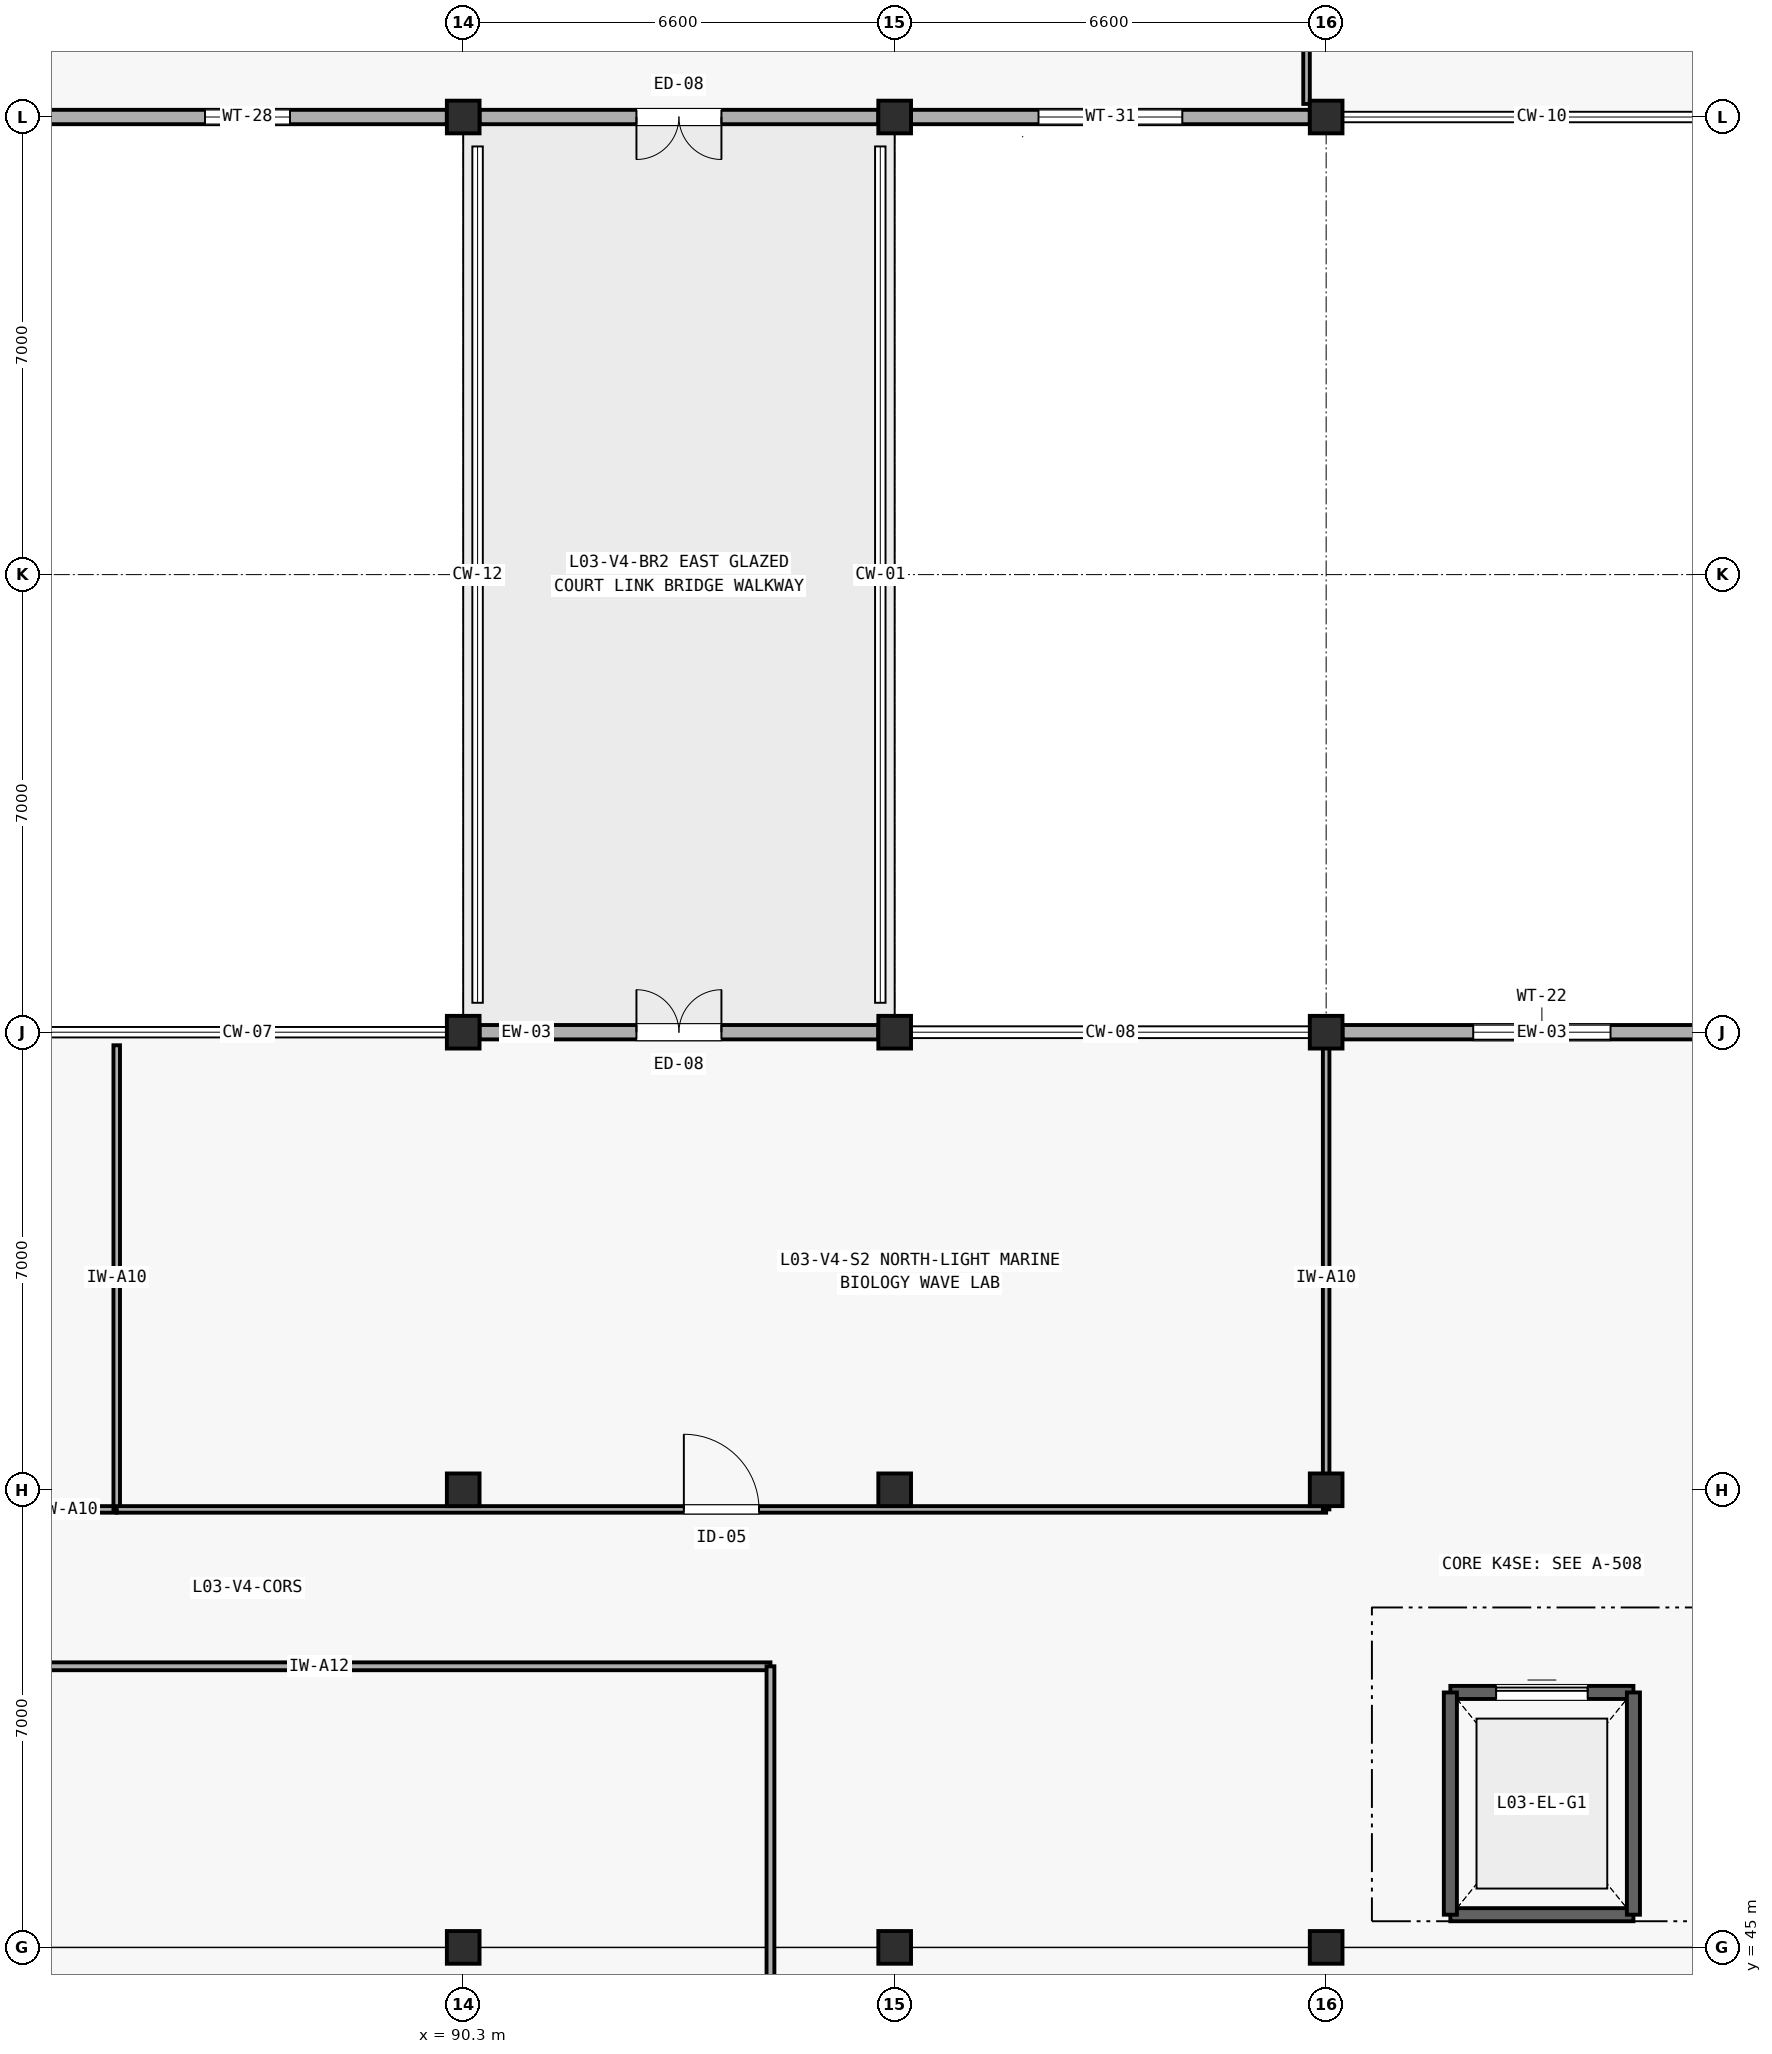
"""IFC4 building model, lengths in metres.
Left out: names, types, materials, properties, quantities, classifications, styles, units other than length and angle.
Written with IfcOpenShell. Run it as: python <this file> out.ifc"""

import sys

from ifc_helpers import new_model, si_unit, direction, frame, frame_2d, origin, origin_2d, place, context, subcontext, project, spatial, rectangle, extrude, element, fill, save


model = new_model("IFC4")
c1 = context("Model", 3, precision=1e-05, world=origin(), true_north=direction((0.0, 1.0)))
c2 = subcontext(c1, "Body", "Model", "MODEL_VIEW")
j1 = project(units=[si_unit("LENGTHUNIT", "METRE"), si_unit("PLANEANGLEUNIT", "RADIAN")], contexts=[c1])
p1 = place(None, origin())
s1 = spatial("IfcSite", under=j1, at=p1, CompositionType="ELEMENT")
p2 = place(p1, origin())
s2 = spatial("IfcBuilding", under=s1, at=p2, CompositionType="ELEMENT")
p3 = place(p2, frame((0.0, 0.0, 12.6)))
s3 = spatial("IfcBuildingStorey", under=s2, at=p3, CompositionType="ELEMENT", Elevation=12.6)
for number, where, z_axis, x_axis in (
    (1, (90.3, 45.0, 0.0), (0.0, 0.0, 1.0), (1.0, 0.0, 0.0)),
    (2, (90.3, 52.0, 0.0), (0.0, 0.0, 1.0), (1.0, 0.0, 0.0)),
    (3, (90.3, 59.0, 0.0), (0.0, 0.0, 1.0), (1.0, 0.0, 0.0)),
    (4, (90.3, 73.0, 0.0), (0.0, 0.0, 1.0), (1.0, 0.0, 0.0)),
    (5, (96.9, 45.0, 0.0), (0.0, 0.0, 1.0), (1.0, 0.0, 0.0)),
    (6, (96.9, 52.0, 0.0), (0.0, 0.0, 1.0), (1.0, 0.0, 0.0)),
    (7, (96.9, 59.0, 0.0), (0.0, 0.0, 1.0), (1.0, 0.0, 0.0)),
    (8, (96.9, 73.0, 0.0), (0.0, 0.0, 1.0), (1.0, 0.0, 0.0)),
    (9, (103.5, 45.0, 0.0), (0.0, 0.0, 1.0), (1.0, 0.0, 0.0)),
    (10, (103.5, 52.0, 0.0), (0.0, 0.0, 1.0), (1.0, 0.0, 0.0)),
    (11, (103.5, 59.0, 0.0), (0.0, 0.0, 1.0), (1.0, 0.0, 0.0)),
    (12, (103.5, 73.0, 0.0), (0.0, 0.0, 1.0), (1.0, 0.0, 0.0)),
):
    element("IfcColumn", number, at=place(p3, frame(where, z_axis=z_axis, x_axis=x_axis)), inside=s3, PredefinedType="COLUMN", context=c2, shape_type="SweptSolid", body=[
        extrude(rectangle(XDim=0.5, YDim=0.5, at=origin_2d()), origin(), (0.0, 0.0, 1.0), 4.2),
    ])
p4 = place(p3, frame((90.55, 59.0, 0.0), z_axis=(0.0, 0.0, 1.0), x_axis=(1.0, 0.0, 0.0)))
e13 = element("IfcWall", 13, at=p4, inside=s3, PredefinedType="SOLIDWALL", context=c2, shape_type="SweptSolid", body=[
    extrude(rectangle(XDim=6.1, YDim=0.22, at=frame_2d((3.05, 0.0))), origin(), (0.0, 0.0, 1.0), 3.405),
])
p5 = place(p4, frame((2.4, 0.0, 0.0)))
e14 = element("IfcOpeningElement", 14, at=p5, cuts=e13, PredefinedType="OPENING", context=c2, shape_type="SweptSolid", body=[
    extrude(rectangle(XDim=1.3, YDim=2.15, at=frame_2d((0.65, 1.075))), frame((0.0, 0.12, 0.0), z_axis=(0.0, -1.0, 0.0), x_axis=(1.0, 0.0, 0.0)), (0.0, 0.0, 1.0), 0.24),
])
p6 = place(p3, frame((103.75, 59.0, 0.0), z_axis=(0.0, 0.0, 1.0), x_axis=(1.0, 0.0, 0.0)))
e15 = element("IfcWall", 15, at=p6, inside=s3, PredefinedType="SOLIDWALL", context=c2, shape_type="SweptSolid", body=[
    extrude(rectangle(XDim=6.1, YDim=0.22, at=frame_2d((3.05, 0.0))), origin(), (0.0, 0.0, 1.0), 3.405),
])
p7 = place(p6, frame((2.0, 0.0, 0.85)))
e16 = element("IfcOpeningElement", 16, at=p7, cuts=e15, PredefinedType="OPENING", context=c2, shape_type="SweptSolid", body=[
    extrude(rectangle(XDim=2.1, YDim=1.6, at=frame_2d((1.05, 0.8))), frame((0.0, 0.12, 0.0), z_axis=(0.0, -1.0, 0.0), x_axis=(1.0, 0.0, 0.0)), (0.0, 0.0, 1.0), 0.24),
])
p8 = place(p3, frame((83.95, 73.0, 0.0), z_axis=(0.0, 0.0, 1.0), x_axis=(1.0, 0.0, 0.0)))
e17 = element("IfcWall", 17, at=p8, inside=s3, PredefinedType="SOLIDWALL", context=c2, shape_type="SweptSolid", body=[
    extrude(rectangle(XDim=6.1, YDim=0.22, at=frame_2d((3.05, 0.0))), origin(), (0.0, 0.0, 1.0), 3.405),
])
p9 = place(p8, frame((2.4, 0.0, 0.85)))
e18 = element("IfcOpeningElement", 18, at=p9, cuts=e17, PredefinedType="OPENING", context=c2, shape_type="SweptSolid", body=[
    extrude(rectangle(XDim=1.3, YDim=1.45, at=frame_2d((0.65, 0.725))), frame((0.0, 0.12, 0.0), z_axis=(0.0, -1.0, 0.0), x_axis=(1.0, 0.0, 0.0)), (0.0, 0.0, 1.0), 0.24),
])
p10 = place(p3, frame((90.55, 73.0, 0.0), z_axis=(0.0, 0.0, 1.0), x_axis=(1.0, 0.0, 0.0)))
e19 = element("IfcWall", 19, at=p10, inside=s3, PredefinedType="SOLIDWALL", context=c2, shape_type="SweptSolid", body=[
    extrude(rectangle(XDim=6.1, YDim=0.22, at=frame_2d((3.05, 0.0))), origin(), (0.0, 0.0, 1.0), 3.405),
])
p11 = place(p10, frame((2.4, 0.0, 0.0)))
e20 = element("IfcOpeningElement", 20, at=p11, cuts=e19, PredefinedType="OPENING", context=c2, shape_type="SweptSolid", body=[
    extrude(rectangle(XDim=1.3, YDim=2.15, at=frame_2d((0.65, 1.075))), frame((0.0, 0.12, 0.0), z_axis=(0.0, -1.0, 0.0), x_axis=(1.0, 0.0, 0.0)), (0.0, 0.0, 1.0), 0.24),
])
p12 = place(p3, frame((97.15, 73.0, 0.0), z_axis=(0.0, 0.0, 1.0), x_axis=(1.0, 0.0, 0.0)))
e21 = element("IfcWall", 21, at=p12, inside=s3, PredefinedType="SOLIDWALL", context=c2, shape_type="SweptSolid", body=[
    extrude(rectangle(XDim=6.1, YDim=0.22, at=frame_2d((3.05, 0.0))), origin(), (0.0, 0.0, 1.0), 3.405),
])
p13 = place(p12, frame((1.95, 0.0, 0.85)))
e22 = element("IfcOpeningElement", 22, at=p13, cuts=e21, PredefinedType="OPENING", context=c2, shape_type="SweptSolid", body=[
    extrude(rectangle(XDim=2.2, YDim=1.2, at=frame_2d((1.1, 0.6))), frame((0.0, 0.12, 0.0), z_axis=(0.0, -1.0, 0.0), x_axis=(1.0, 0.0, 0.0)), (0.0, 0.0, 1.0), 0.24),
])
p14 = place(p3, frame((105.4, 45.5, 0.0), z_axis=(0.0, 0.0, 1.0), x_axis=(1.0, 0.0, 0.0)))
e23 = element("IfcWall", 23, at=p14, inside=s3, PredefinedType="SHEAR", context=c2, shape_type="SweptSolid", body=[
    extrude(rectangle(XDim=2.8, YDim=0.2, at=frame_2d((1.4, 0.0))), origin(), (0.0, 0.0, 1.0), 4.2),
])
p15 = place(p3, frame((105.4, 48.9, 0.0), z_axis=(0.0, 0.0, 1.0), x_axis=(1.0, 0.0, 0.0)))
e24 = element("IfcWall", 24, at=p15, inside=s3, PredefinedType="SHEAR", context=c2, shape_type="SweptSolid", body=[
    extrude(rectangle(XDim=2.8, YDim=0.2, at=frame_2d((1.4, 0.0))), origin(), (0.0, 0.0, 1.0), 4.2),
])
p16 = place(p15, frame((0.7, 0.0, 0.0)))
e25 = element("IfcOpeningElement", 25, at=p16, cuts=e24, PredefinedType="OPENING", context=c2, shape_type="SweptSolid", body=[
    extrude(rectangle(XDim=1.4, YDim=2.3, at=frame_2d((0.7, 1.15))), frame((0.0, 0.11, 0.0), z_axis=(0.0, -1.0, 0.0), x_axis=(1.0, 0.0, 0.0)), (0.0, 0.0, 1.0), 0.22),
])
for number, where, z_axis, x_axis in (
    (26, (105.4, 45.5, 0.0), (0.0, 0.0, 1.0), (0.0, 1.0, 0.0)),
    (27, (108.2, 45.5, 0.0), (0.0, 0.0, 1.0), (0.0, 1.0, 0.0)),
):
    element("IfcWall", number, at=place(p3, frame(where, z_axis=z_axis, x_axis=x_axis)), inside=s3, PredefinedType="SHEAR", context=c2, shape_type="SweptSolid", body=[
        extrude(rectangle(XDim=3.4, YDim=0.2, at=frame_2d((1.7, 0.0))), origin(), (0.0, 0.0, 1.0), 4.2),
    ])
p17 = place(p3, frame((63.6, 51.7, 0.0), z_axis=(0.0, 0.0, 1.0), x_axis=(1.0, 0.0, 0.0)))
e28 = element("IfcWall", 28, at=p17, inside=s3, PredefinedType="PARTITIONING", context=c2, shape_type="SweptSolid", body=[
    extrude(rectangle(XDim=21.4, YDim=0.1, at=frame_2d((10.7, 0.0))), origin(), (0.0, 0.0, 1.0), 3.405),
])
p18 = place(p17, frame((10.175, 0.0, 0.0)))
e29 = element("IfcOpeningElement", 29, at=p18, cuts=e28, PredefinedType="OPENING", context=c2, shape_type="SweptSolid", body=[
    extrude(rectangle(XDim=1.05, YDim=2.15, at=frame_2d((0.525, 1.075))), frame((0.0, 0.06, 0.0), z_axis=(0.0, -1.0, 0.0), x_axis=(1.0, 0.0, 0.0)), (0.0, 0.0, 1.0), 0.12),
])
p19 = place(p3, frame((85.0, 51.7, 0.0), z_axis=(0.0, 0.0, 1.0), x_axis=(0.0, 1.0, 0.0)))
e30 = element("IfcWall", 30, at=p19, inside=s3, PredefinedType="PARTITIONING", context=c2, shape_type="SweptSolid", body=[
    extrude(rectangle(XDim=7.1, YDim=0.1, at=frame_2d((3.55, 0.0))), origin(), (0.0, 0.0, 1.0), 3.9),
])
p20 = place(p3, frame((85.0, 51.7, 0.0), z_axis=(0.0, 0.0, 1.0), x_axis=(1.0, 0.0, 0.0)))
e31 = element("IfcWall", 31, at=p20, inside=s3, PredefinedType="PARTITIONING", context=c2, shape_type="SweptSolid", body=[
    extrude(rectangle(XDim=18.5, YDim=0.1, at=frame_2d((9.25, 0.0))), origin(), (0.0, 0.0, 1.0), 3.405),
])
p21 = place(p20, frame((8.675, 0.0, 0.0)))
e32 = element("IfcOpeningElement", 32, at=p21, cuts=e31, PredefinedType="OPENING", context=c2, shape_type="SweptSolid", body=[
    extrude(rectangle(XDim=1.15, YDim=2.15, at=frame_2d((0.575, 1.075))), frame((0.0, 0.06, 0.0), z_axis=(0.0, -1.0, 0.0), x_axis=(1.0, 0.0, 0.0)), (0.0, 0.0, 1.0), 0.12),
])
p22 = place(p3, frame((103.5, 51.7, 0.0), z_axis=(0.0, 0.0, 1.0), x_axis=(0.0, 1.0, 0.0)))
e33 = element("IfcWall", 33, at=p22, inside=s3, PredefinedType="PARTITIONING", context=c2, shape_type="SweptSolid", body=[
    extrude(rectangle(XDim=7.1, YDim=0.1, at=frame_2d((3.55, 0.0))), origin(), (0.0, 0.0, 1.0), 3.9),
])
p23 = place(p3, frame((64.2, 49.3, 0.0), z_axis=(0.0, 0.0, 1.0), x_axis=(1.0, 0.0, 0.0)))
e34 = element("IfcWall", 34, at=p23, inside=s3, PredefinedType="PARTITIONING", context=c2, shape_type="SweptSolid", body=[
    extrude(rectangle(XDim=30.8, YDim=0.12, at=frame_2d((15.4, 0.0))), origin(), (0.0, 0.0, 1.0), 3.9),
])
p24 = place(p23, frame((14.775, 0.0, 0.0)))
e35 = element("IfcOpeningElement", 35, at=p24, cuts=e34, PredefinedType="OPENING", context=c2, shape_type="SweptSolid", body=[
    extrude(rectangle(XDim=1.25, YDim=2.15, at=frame_2d((0.625, 1.075))), frame((0.0, 0.07, 0.0), z_axis=(0.0, -1.0, 0.0), x_axis=(1.0, 0.0, 0.0)), (0.0, 0.0, 1.0), 0.14),
])
p25 = place(p3, frame((95.0, 38.2, 0.0), z_axis=(0.0, 0.0, 1.0), x_axis=(0.0, 1.0, 0.0)))
e36 = element("IfcWall", 36, at=p25, inside=s3, PredefinedType="PARTITIONING", context=c2, shape_type="SweptSolid", body=[
    extrude(rectangle(XDim=11.1, YDim=0.12, at=frame_2d((5.55, 0.0))), origin(), (0.0, 0.0, 1.0), 3.9),
])
p26 = place(p3, frame((103.2, 73.2, 0.0), z_axis=(0.0, 0.0, 1.0), x_axis=(0.0, 1.0, 0.0)))
e37 = element("IfcWall", 37, at=p26, inside=s3, PredefinedType="PARTITIONING", context=c2, shape_type="SweptSolid", body=[
    extrude(rectangle(XDim=4.1, YDim=0.1, at=frame_2d((2.05, 0.0))), origin(), (0.0, 0.0, 1.0), 3.9),
])
p27 = place(p5, origin())
e38 = element("IfcDoor", 38, at=p27, inside=s3, OperationType="DOUBLE_DOOR_SINGLE_SWING", PredefinedType="DOOR", context=c2, shape_type="SweptSolid", body=[
    extrude(rectangle(XDim=1.3, YDim=2.15, at=frame_2d((0.65, 1.075))), frame((0.0, 0.025, 0.0), z_axis=(0.0, -1.0, 0.0), x_axis=(1.0, 0.0, 0.0)), (0.0, 0.0, 1.0), 0.05),
])
fill(e14, e38)
p28 = place(p7, origin())
e39 = element("IfcWindow", 39, at=p28, inside=s3, PartitioningType="SINGLE_PANEL", PredefinedType="WINDOW", context=c2, shape_type="SweptSolid", body=[
    extrude(rectangle(XDim=2.1, YDim=1.6, at=frame_2d((1.05, 0.8))), frame((0.0, 0.03, 0.0), z_axis=(0.0, -1.0, 0.0), x_axis=(1.0, 0.0, 0.0)), (0.0, 0.0, 1.0), 0.06),
])
fill(e16, e39)
p29 = place(p9, origin())
e40 = element("IfcWindow", 40, at=p29, inside=s3, PartitioningType="SINGLE_PANEL", PredefinedType="WINDOW", context=c2, shape_type="SweptSolid", body=[
    extrude(rectangle(XDim=1.3, YDim=1.45, at=frame_2d((0.65, 0.725))), frame((0.0, 0.03, 0.0), z_axis=(0.0, -1.0, 0.0), x_axis=(1.0, 0.0, 0.0)), (0.0, 0.0, 1.0), 0.06),
])
fill(e18, e40)
p30 = place(p11, frame((1.3, 0.0, 0.0), z_axis=(0.0, 0.0, 1.0), x_axis=(-1.0, 0.0, 0.0)))
e41 = element("IfcDoor", 41, at=p30, inside=s3, OperationType="DOUBLE_DOOR_SINGLE_SWING", PredefinedType="DOOR", context=c2, shape_type="SweptSolid", body=[
    extrude(rectangle(XDim=1.3, YDim=2.15, at=frame_2d((0.65, 1.075))), frame((0.0, 0.025, 0.0), z_axis=(0.0, -1.0, 0.0), x_axis=(1.0, 0.0, 0.0)), (0.0, 0.0, 1.0), 0.05),
])
fill(e20, e41)
p31 = place(p13, origin())
e42 = element("IfcWindow", 42, at=p31, inside=s3, PartitioningType="SINGLE_PANEL", PredefinedType="WINDOW", context=c2, shape_type="SweptSolid", body=[
    extrude(rectangle(XDim=2.2, YDim=1.2, at=frame_2d((1.1, 0.6))), frame((0.0, 0.03, 0.0), z_axis=(0.0, -1.0, 0.0), x_axis=(1.0, 0.0, 0.0)), (0.0, 0.0, 1.0), 0.06),
])
fill(e22, e42)
p32 = place(p16, origin())
e43 = element("IfcDoor", 43, at=p32, inside=s3, OperationType="SLIDING_TO_LEFT", PredefinedType="DOOR", context=c2, shape_type="SweptSolid", body=[
    extrude(rectangle(XDim=1.4, YDim=2.3, at=frame_2d((0.7, 1.15))), frame((0.0, 0.025, 0.0), z_axis=(0.0, -1.0, 0.0), x_axis=(1.0, 0.0, 0.0)), (0.0, 0.0, 1.0), 0.05),
])
fill(e25, e43)
p33 = place(p21, origin())
e44 = element("IfcDoor", 44, at=p33, inside=s3, OperationType="SINGLE_SWING_LEFT", PredefinedType="DOOR", context=c2, shape_type="SweptSolid", body=[
    extrude(rectangle(XDim=1.15, YDim=2.15, at=frame_2d((0.575, 1.075))), frame((0.0, 0.025, 0.0), z_axis=(0.0, -1.0, 0.0), x_axis=(1.0, 0.0, 0.0)), (0.0, 0.0, 1.0), 0.05),
])
fill(e32, e44)
save(model, sys.argv[1])
